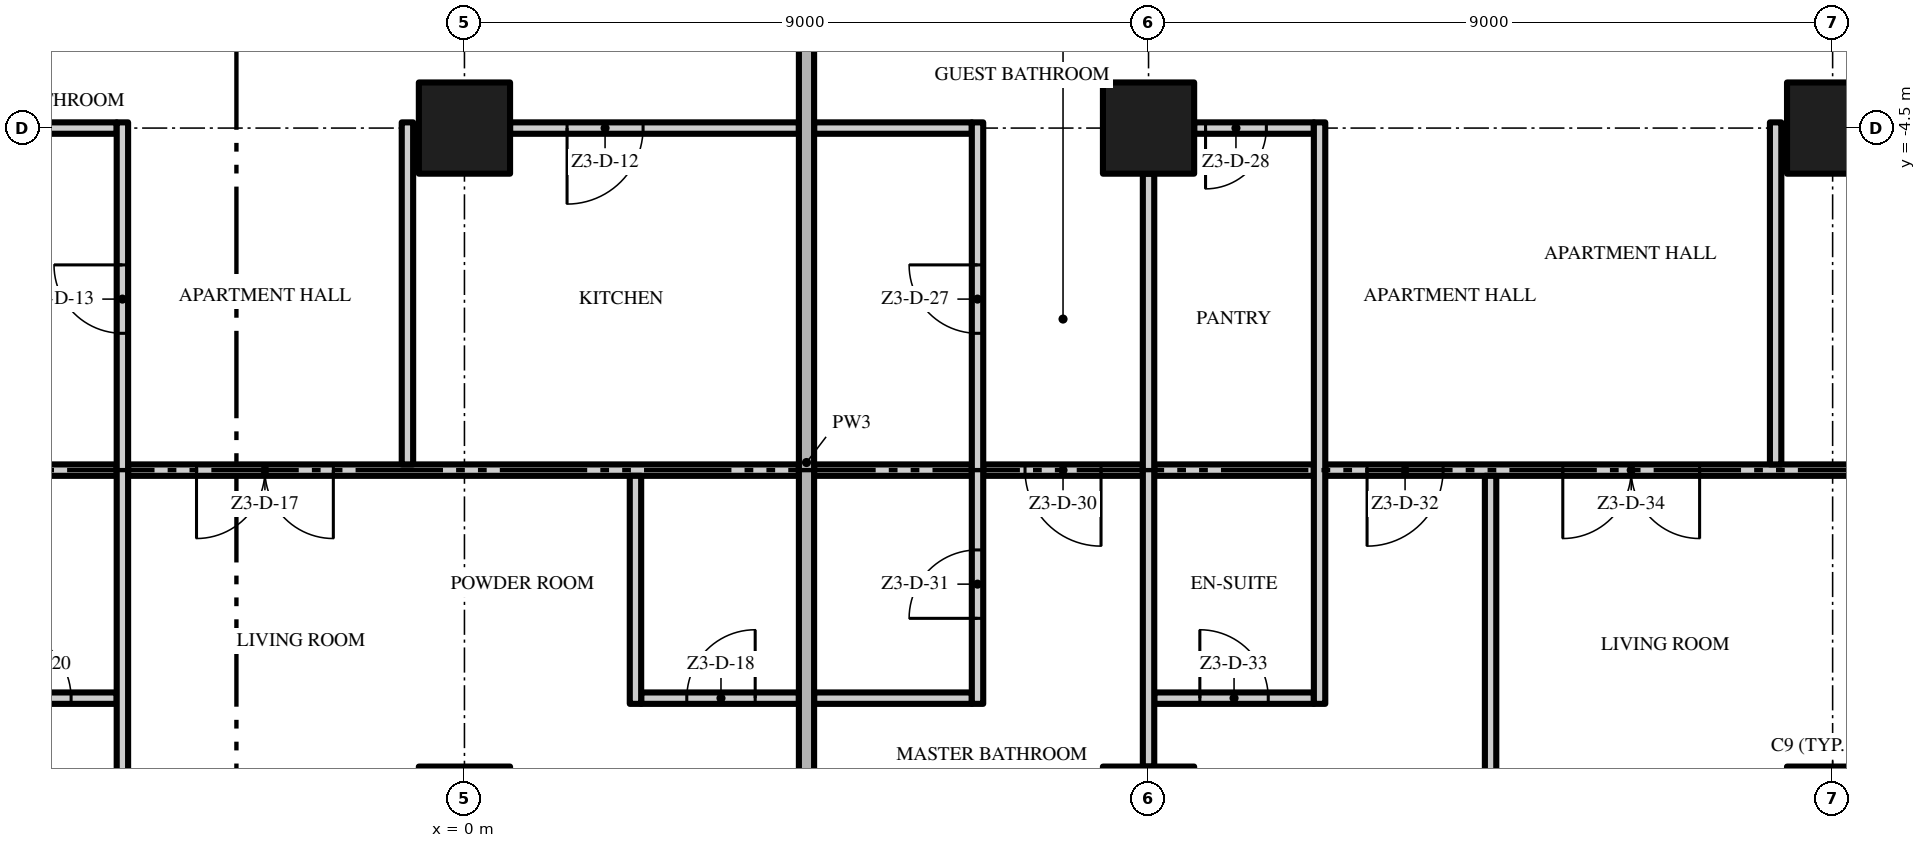
"""IFC4 building model, lengths in metres.
Left out: names, types, materials, properties, quantities, classifications, styles, units other than length and angle.
Written with IfcOpenShell. Run it as: python <this file> out.ifc"""

import sys

from ifc_helpers import new_model, si_unit, direction, frame, frame_2d, origin, origin_2d, place, context, subcontext, project, spatial, rectangle, extrude, element, fill, save


model = new_model("IFC4")
c1 = context("Model", 3, precision=1e-05, world=origin(), true_north=direction((0.0, 1.0)))
c2 = subcontext(c1, "Body", "Model", "MODEL_VIEW")
j1 = project(units=[si_unit("LENGTHUNIT", "METRE"), si_unit("PLANEANGLEUNIT", "RADIAN")], contexts=[c1])
p1 = place(None, origin())
s1 = spatial("IfcSite", under=j1, at=p1, CompositionType="ELEMENT")
p2 = place(p1, origin())
s2 = spatial("IfcBuilding", under=s1, at=p2, CompositionType="ELEMENT")
p3 = place(p2, frame((0.0, 0.0, 163.0)))
s3 = spatial("IfcBuildingStorey", under=s2, at=p3, CompositionType="ELEMENT", Elevation=163.0)
for number, where, z_axis, x_axis in (
    (1, (0.0, -13.5, 0.0), (0.0, 0.0, 1.0), (1.0, 0.0, 0.0)),
    (2, (0.0, -4.5, 0.0), (0.0, 0.0, 1.0), (1.0, 0.0, 0.0)),
    (3, (18.0, -13.5, 0.0), (0.0, 0.0, 1.0), (1.0, 0.0, 0.0)),
    (4, (18.0, -4.5, 0.0), (0.0, 0.0, 1.0), (1.0, 0.0, 0.0)),
    (5, (9.0, -13.5, 0.0), (0.0, 0.0, 1.0), (1.0, 0.0, 0.0)),
    (6, (9.0, -4.5, 0.0), (0.0, 0.0, 1.0), (1.0, 0.0, 0.0)),
):
    element("IfcColumn", number, at=place(p3, frame(where, z_axis=z_axis, x_axis=x_axis)), inside=s3, PredefinedType="COLUMN", context=c2, shape_type="SweptSolid", body=[
        extrude(rectangle(XDim=1.2, YDim=1.2, at=origin_2d()), origin(), (0.0, 0.0, 1.0), 3.5),
    ])
p4 = place(p3, frame((-6.675, -12.0, 0.0), z_axis=(0.0, 0.0, 1.0), x_axis=(1.0, 0.0, 0.0)))
e7 = element("IfcWall", 7, at=p4, inside=s3, PredefinedType="PARTITIONING", context=c2, shape_type="SweptSolid", body=[
    extrude(rectangle(XDim=2.1, YDim=0.15, at=frame_2d((1.05, 0.0))), origin(), (0.0, 0.0, 1.0), 3.5),
])
p5 = place(p4, frame((0.6, 0.0, 0.0)))
e8 = element("IfcOpeningElement", 8, at=p5, cuts=e7, PredefinedType="OPENING", context=c2, shape_type="SweptSolid", body=[
    extrude(rectangle(XDim=0.9, YDim=2.1, at=frame_2d((0.45, 1.05))), frame((0.0, 0.085, 0.0), z_axis=(0.0, -1.0, 0.0), x_axis=(1.0, 0.0, 0.0)), (0.0, 0.0, 1.0), 0.17),
])
p6 = place(p3, frame((2.325, -12.0, 0.0), z_axis=(0.0, 0.0, 1.0), x_axis=(1.0, 0.0, 0.0)))
e9 = element("IfcWall", 9, at=p6, inside=s3, PredefinedType="PARTITIONING", context=c2, shape_type="SweptSolid", body=[
    extrude(rectangle(XDim=2.075, YDim=0.15, at=frame_2d((1.038, 0.0))), origin(), (0.0, 0.0, 1.0), 3.5),
])
p7 = place(p6, frame((0.6, 0.0, 0.0)))
e10 = element("IfcOpeningElement", 10, at=p7, cuts=e9, PredefinedType="OPENING", context=c2, shape_type="SweptSolid", body=[
    extrude(rectangle(XDim=0.9, YDim=2.1, at=frame_2d((0.45, 1.05))), frame((0.0, 0.085, 0.0), z_axis=(0.0, -1.0, 0.0), x_axis=(1.0, 0.0, 0.0)), (0.0, 0.0, 1.0), 0.17),
])
p8 = place(p3, frame((4.6, -12.0, 0.0), z_axis=(0.0, 0.0, 1.0), x_axis=(1.0, 0.0, 0.0)))
e11 = element("IfcWall", 11, at=p8, inside=s3, PredefinedType="PARTITIONING", context=c2, shape_type="SweptSolid", body=[
    extrude(rectangle(XDim=2.075, YDim=0.15, at=frame_2d((1.038, 0.0))), origin(), (0.0, 0.0, 1.0), 3.5),
])
p9 = place(p3, frame((9.075, -12.0, 0.0), z_axis=(0.0, 0.0, 1.0), x_axis=(1.0, 0.0, 0.0)))
e12 = element("IfcWall", 12, at=p9, inside=s3, PredefinedType="PARTITIONING", context=c2, shape_type="SweptSolid", body=[
    extrude(rectangle(XDim=2.1, YDim=0.15, at=frame_2d((1.05, 0.0))), origin(), (0.0, 0.0, 1.0), 3.5),
])
p10 = place(p9, frame((0.6, 0.0, 0.0)))
e13 = element("IfcOpeningElement", 13, at=p10, cuts=e12, PredefinedType="OPENING", context=c2, shape_type="SweptSolid", body=[
    extrude(rectangle(XDim=0.9, YDim=2.1, at=frame_2d((0.45, 1.05))), frame((0.0, 0.085, 0.0), z_axis=(0.0, -1.0, 0.0), x_axis=(1.0, 0.0, 0.0)), (0.0, 0.0, 1.0), 0.17),
])
p11 = place(p3, frame((-6.675, -9.0, 0.0), z_axis=(0.0, 0.0, 1.0), x_axis=(1.0, 0.0, 0.0)))
e14 = element("IfcWall", 14, at=p11, inside=s3, PredefinedType="PARTITIONING", context=c2, shape_type="SweptSolid", body=[
    extrude(rectangle(XDim=2.1, YDim=0.15, at=frame_2d((1.05, 0.0))), origin(), (0.0, 0.0, 1.0), 3.5),
])
p12 = place(p3, frame((4.4, -9.0, 0.0), z_axis=(0.0, 0.0, 1.0), x_axis=(-1.0, 0.0, 0.0)))
e15 = element("IfcWall", 15, at=p12, inside=s3, PredefinedType="PARTITIONING", context=c2, shape_type="SweptSolid", body=[
    extrude(rectangle(XDim=8.825, YDim=0.15, at=frame_2d((4.412, 0.0))), origin(), (0.0, 0.0, 1.0), 3.5),
])
p13 = place(p12, frame((6.125, 0.0, 0.0)))
e16 = element("IfcOpeningElement", 16, at=p13, cuts=e15, PredefinedType="OPENING", context=c2, shape_type="SweptSolid", body=[
    extrude(rectangle(XDim=1.8, YDim=2.4, at=frame_2d((0.9, 1.2))), frame((0.0, 0.085, 0.0), z_axis=(0.0, -1.0, 0.0), x_axis=(1.0, 0.0, 0.0)), (0.0, 0.0, 1.0), 0.17),
])
p14 = place(p3, frame((4.6, -9.0, 0.0), z_axis=(0.0, 0.0, 1.0), x_axis=(1.0, 0.0, 0.0)))
e17 = element("IfcWall", 17, at=p14, inside=s3, PredefinedType="PARTITIONING", context=c2, shape_type="SweptSolid", body=[
    extrude(rectangle(XDim=2.075, YDim=0.15, at=frame_2d((1.038, 0.0))), origin(), (0.0, 0.0, 1.0), 3.5),
])
p15 = place(p3, frame((8.925, -9.0, 0.0), z_axis=(0.0, 0.0, 1.0), x_axis=(-1.0, 0.0, 0.0)))
e18 = element("IfcWall", 18, at=p15, inside=s3, PredefinedType="PARTITIONING", context=c2, shape_type="SweptSolid", body=[
    extrude(rectangle(XDim=2.1, YDim=0.15, at=frame_2d((1.05, 0.0))), origin(), (0.0, 0.0, 1.0), 3.5),
])
p16 = place(p15, frame((0.55, 0.0, 0.0)))
e19 = element("IfcOpeningElement", 19, at=p16, cuts=e18, PredefinedType="OPENING", context=c2, shape_type="SweptSolid", body=[
    extrude(rectangle(XDim=1.0, YDim=2.4, at=frame_2d((0.5, 1.2))), frame((0.0, 0.085, 0.0), z_axis=(0.0, -1.0, 0.0), x_axis=(1.0, 0.0, 0.0)), (0.0, 0.0, 1.0), 0.17),
])
p17 = place(p3, frame((9.075, -9.0, 0.0), z_axis=(0.0, 0.0, 1.0), x_axis=(1.0, 0.0, 0.0)))
e20 = element("IfcWall", 20, at=p17, inside=s3, PredefinedType="PARTITIONING", context=c2, shape_type="SweptSolid", body=[
    extrude(rectangle(XDim=2.1, YDim=0.15, at=frame_2d((1.05, 0.0))), origin(), (0.0, 0.0, 1.0), 3.5),
])
p18 = place(p3, frame((22.2, -9.0, 0.0), z_axis=(0.0, 0.0, 1.0), x_axis=(-1.0, 0.0, 0.0)))
e21 = element("IfcWall", 21, at=p18, inside=s3, PredefinedType="PARTITIONING", context=c2, shape_type="SweptSolid", body=[
    extrude(rectangle(XDim=10.875, YDim=0.15, at=frame_2d((5.438, 0.0))), origin(), (0.0, 0.0, 1.0), 3.5),
])
p19 = place(p18, frame((9.325, 0.0, 0.0)))
e22 = element("IfcOpeningElement", 22, at=p19, cuts=e21, PredefinedType="OPENING", context=c2, shape_type="SweptSolid", body=[
    extrude(rectangle(XDim=1.0, YDim=2.4, at=frame_2d((0.5, 1.2))), frame((0.0, 0.085, 0.0), z_axis=(0.0, -1.0, 0.0), x_axis=(1.0, 0.0, 0.0)), (0.0, 0.0, 1.0), 0.17),
])
p20 = place(p18, frame((5.95, 0.0, 0.0)))
e23 = element("IfcOpeningElement", 23, at=p20, cuts=e21, PredefinedType="OPENING", context=c2, shape_type="SweptSolid", body=[
    extrude(rectangle(XDim=1.8, YDim=2.4, at=frame_2d((0.9, 1.2))), frame((0.0, 0.085, 0.0), z_axis=(0.0, -1.0, 0.0), x_axis=(1.0, 0.0, 0.0)), (0.0, 0.0, 1.0), 0.17),
])
p21 = place(p3, frame((-6.675, -4.5, 0.0), z_axis=(0.0, 0.0, 1.0), x_axis=(1.0, 0.0, 0.0)))
e24 = element("IfcWall", 24, at=p21, inside=s3, PredefinedType="PARTITIONING", context=c2, shape_type="SweptSolid", body=[
    extrude(rectangle(XDim=2.1, YDim=0.15, at=frame_2d((1.05, 0.0))), origin(), (0.0, 0.0, 1.0), 3.5),
])
p22 = place(p3, frame((4.4, -4.5, 0.0), z_axis=(0.0, 0.0, 1.0), x_axis=(-1.0, 0.0, 0.0)))
e25 = element("IfcWall", 25, at=p22, inside=s3, PredefinedType="PARTITIONING", context=c2, shape_type="SweptSolid", body=[
    extrude(rectangle(XDim=3.8, YDim=0.15, at=frame_2d((1.9, 0.0))), origin(), (0.0, 0.0, 1.0), 3.5),
])
p23 = place(p22, frame((2.05, 0.0, 0.0)))
e26 = element("IfcOpeningElement", 26, at=p23, cuts=e25, PredefinedType="OPENING", context=c2, shape_type="SweptSolid", body=[
    extrude(rectangle(XDim=1.0, YDim=2.4, at=frame_2d((0.5, 1.2))), frame((0.0, 0.085, 0.0), z_axis=(0.0, -1.0, 0.0), x_axis=(1.0, 0.0, 0.0)), (0.0, 0.0, 1.0), 0.17),
])
p24 = place(p3, frame((4.6, -4.5, 0.0), z_axis=(0.0, 0.0, 1.0), x_axis=(1.0, 0.0, 0.0)))
e27 = element("IfcWall", 27, at=p24, inside=s3, PredefinedType="PARTITIONING", context=c2, shape_type="SweptSolid", body=[
    extrude(rectangle(XDim=2.075, YDim=0.15, at=frame_2d((1.038, 0.0))), origin(), (0.0, 0.0, 1.0), 3.5),
])
p25 = place(p3, frame((11.175, -4.5, 0.0), z_axis=(0.0, 0.0, 1.0), x_axis=(-1.0, 0.0, 0.0)))
e28 = element("IfcWall", 28, at=p25, inside=s3, PredefinedType="PARTITIONING", context=c2, shape_type="SweptSolid", body=[
    extrude(rectangle(XDim=1.575, YDim=0.15, at=frame_2d((0.787, 0.0))), origin(), (0.0, 0.0, 1.0), 3.5),
])
p26 = place(p25, frame((0.625, 0.0, 0.0)))
e29 = element("IfcOpeningElement", 29, at=p26, cuts=e28, PredefinedType="OPENING", context=c2, shape_type="SweptSolid", body=[
    extrude(rectangle(XDim=0.8, YDim=2.0, at=frame_2d((0.4, 1.0))), frame((0.0, 0.085, 0.0), z_axis=(0.0, -1.0, 0.0), x_axis=(1.0, 0.0, 0.0)), (0.0, 0.0, 1.0), 0.17),
])
p27 = place(p3, frame((-4.5, -17.7, 0.0), z_axis=(0.0, 0.0, 1.0), x_axis=(0.0, 1.0, 0.0)))
e30 = element("IfcWall", 30, at=p27, inside=s3, PredefinedType="PARTITIONING", context=c2, shape_type="SweptSolid", body=[
    extrude(rectangle(XDim=13.275, YDim=0.15, at=frame_2d((6.638, 0.0))), origin(), (0.0, 0.0, 1.0), 3.5),
])
p28 = place(p27, frame((10.5, 0.0, 0.0)))
e31 = element("IfcOpeningElement", 31, at=p28, cuts=e30, PredefinedType="OPENING", context=c2, shape_type="SweptSolid", body=[
    extrude(rectangle(XDim=0.9, YDim=2.1, at=frame_2d((0.45, 1.05))), frame((0.0, 0.085, 0.0), z_axis=(0.0, -1.0, 0.0), x_axis=(1.0, 0.0, 0.0)), (0.0, 0.0, 1.0), 0.17),
])
p29 = place(p3, frame((-0.75, -8.925, 0.0), z_axis=(0.0, 0.0, 1.0), x_axis=(0.0, 1.0, 0.0)))
e32 = element("IfcWall", 32, at=p29, inside=s3, PredefinedType="PARTITIONING", context=c2, shape_type="SweptSolid", body=[
    extrude(rectangle(XDim=4.5, YDim=0.15, at=frame_2d((2.25, 0.0))), origin(), (0.0, 0.0, 1.0), 3.5),
])
p30 = place(p3, frame((2.25, -12.075, 0.0), z_axis=(0.0, 0.0, 1.0), x_axis=(0.0, 1.0, 0.0)))
e33 = element("IfcWall", 33, at=p30, inside=s3, PredefinedType="PARTITIONING", context=c2, shape_type="SweptSolid", body=[
    extrude(rectangle(XDim=3.0, YDim=0.15, at=frame_2d((1.5, 0.0))), origin(), (0.0, 0.0, 1.0), 3.5),
])
p31 = place(p3, frame((4.5, -17.7, 0.0), z_axis=(0.0, 0.0, 1.0), x_axis=(0.0, 1.0, 0.0)))
e34 = element("IfcWall", 34, at=p31, inside=s3, PredefinedType="PARTITIONING", context=c2, shape_type="SweptSolid", body=[
    extrude(rectangle(XDim=17.6, YDim=0.2, at=frame_2d((8.8, 0.0))), origin(), (0.0, 0.0, 1.0), 3.5),
])
p32 = place(p3, frame((6.75, -12.075, 0.0), z_axis=(0.0, 0.0, 1.0), x_axis=(0.0, 1.0, 0.0)))
e35 = element("IfcWall", 35, at=p32, inside=s3, PredefinedType="PARTITIONING", context=c2, shape_type="SweptSolid", body=[
    extrude(rectangle(XDim=7.65, YDim=0.15, at=frame_2d((3.825, 0.0))), origin(), (0.0, 0.0, 1.0), 3.5),
])
p33 = place(p32, frame((4.875, 0.0, 0.0)))
e36 = element("IfcOpeningElement", 36, at=p33, cuts=e35, PredefinedType="OPENING", context=c2, shape_type="SweptSolid", body=[
    extrude(rectangle(XDim=0.9, YDim=2.1, at=frame_2d((0.45, 1.05))), frame((0.0, 0.085, 0.0), z_axis=(0.0, -1.0, 0.0), x_axis=(1.0, 0.0, 0.0)), (0.0, 0.0, 1.0), 0.17),
])
p34 = place(p32, frame((1.125, 0.0, 0.0)))
e37 = element("IfcOpeningElement", 37, at=p34, cuts=e35, PredefinedType="OPENING", context=c2, shape_type="SweptSolid", body=[
    extrude(rectangle(XDim=0.9, YDim=2.1, at=frame_2d((0.45, 1.05))), frame((0.0, 0.085, 0.0), z_axis=(0.0, -1.0, 0.0), x_axis=(1.0, 0.0, 0.0)), (0.0, 0.0, 1.0), 0.17),
])
p35 = place(p3, frame((9.0, -12.9, 0.0), z_axis=(0.0, 0.0, 1.0), x_axis=(0.0, 1.0, 0.0)))
e38 = element("IfcWall", 38, at=p35, inside=s3, PredefinedType="PARTITIONING", context=c2, shape_type="SweptSolid", body=[
    extrude(rectangle(XDim=7.8, YDim=0.15, at=frame_2d((3.9, 0.0))), origin(), (0.0, 0.0, 1.0), 3.5),
])
p36 = place(p3, frame((11.25, -12.075, 0.0), z_axis=(0.0, 0.0, 1.0), x_axis=(0.0, 1.0, 0.0)))
e39 = element("IfcWall", 39, at=p36, inside=s3, PredefinedType="PARTITIONING", context=c2, shape_type="SweptSolid", body=[
    extrude(rectangle(XDim=7.65, YDim=0.15, at=frame_2d((3.825, 0.0))), origin(), (0.0, 0.0, 1.0), 3.5),
])
p37 = place(p3, frame((13.5, -17.7, 0.0), z_axis=(0.0, 0.0, 1.0), x_axis=(0.0, 1.0, 0.0)))
e40 = element("IfcWall", 40, at=p37, inside=s3, PredefinedType="PARTITIONING", context=c2, shape_type="SweptSolid", body=[
    extrude(rectangle(XDim=8.625, YDim=0.15, at=frame_2d((4.312, 0.0))), origin(), (0.0, 0.0, 1.0), 3.5),
])
p38 = place(p3, frame((17.25, -8.925, 0.0), z_axis=(0.0, 0.0, 1.0), x_axis=(0.0, 1.0, 0.0)))
e41 = element("IfcWall", 41, at=p38, inside=s3, PredefinedType="PARTITIONING", context=c2, shape_type="SweptSolid", body=[
    extrude(rectangle(XDim=4.5, YDim=0.15, at=frame_2d((2.25, 0.0))), origin(), (0.0, 0.0, 1.0), 3.5),
])
p39 = place(p23, origin())
e42 = element("IfcDoor", 42, at=p39, inside=s3, OperationType="SINGLE_SWING_RIGHT", PredefinedType="DOOR", context=c2, shape_type="SweptSolid", body=[
    extrude(rectangle(XDim=1.0, YDim=2.4, at=frame_2d((0.5, 1.2))), frame((0.0, 0.025, 0.0), z_axis=(0.0, -1.0, 0.0), x_axis=(1.0, 0.0, 0.0)), (0.0, 0.0, 1.0), 0.05),
])
fill(e26, e42)
p40 = place(p28, origin())
e43 = element("IfcDoor", 43, at=p40, inside=s3, OperationType="SINGLE_SWING_RIGHT", PredefinedType="DOOR", context=c2, shape_type="SweptSolid", body=[
    extrude(rectangle(XDim=0.9, YDim=2.1, at=frame_2d((0.45, 1.05))), frame((0.0, 0.025, 0.0), z_axis=(0.0, -1.0, 0.0), x_axis=(1.0, 0.0, 0.0)), (0.0, 0.0, 1.0), 0.05),
])
fill(e31, e43)
p41 = place(p13, origin())
e44 = element("IfcDoor", 44, at=p41, inside=s3, OperationType="DOUBLE_DOOR_SINGLE_SWING", PredefinedType="DOOR", context=c2, shape_type="SweptSolid", body=[
    extrude(rectangle(XDim=1.8, YDim=2.4, at=frame_2d((0.9, 1.2))), frame((0.0, 0.025, 0.0), z_axis=(0.0, -1.0, 0.0), x_axis=(1.0, 0.0, 0.0)), (0.0, 0.0, 1.0), 0.05),
])
fill(e16, e44)
p42 = place(p7, origin())
e45 = element("IfcDoor", 45, at=p42, inside=s3, OperationType="SINGLE_SWING_RIGHT", PredefinedType="DOOR", context=c2, shape_type="SweptSolid", body=[
    extrude(rectangle(XDim=0.9, YDim=2.1, at=frame_2d((0.45, 1.05))), frame((0.0, 0.025, 0.0), z_axis=(0.0, -1.0, 0.0), x_axis=(1.0, 0.0, 0.0)), (0.0, 0.0, 1.0), 0.05),
])
fill(e10, e45)
p43 = place(p5, origin())
e46 = element("IfcDoor", 46, at=p43, inside=s3, OperationType="SINGLE_SWING_LEFT", PredefinedType="DOOR", context=c2, shape_type="SweptSolid", body=[
    extrude(rectangle(XDim=0.9, YDim=2.1, at=frame_2d((0.45, 1.05))), frame((0.0, 0.025, 0.0), z_axis=(0.0, -1.0, 0.0), x_axis=(1.0, 0.0, 0.0)), (0.0, 0.0, 1.0), 0.05),
])
fill(e8, e46)
p44 = place(p33, origin())
e47 = element("IfcDoor", 47, at=p44, inside=s3, OperationType="SINGLE_SWING_RIGHT", PredefinedType="DOOR", context=c2, shape_type="SweptSolid", body=[
    extrude(rectangle(XDim=0.9, YDim=2.1, at=frame_2d((0.45, 1.05))), frame((0.0, 0.025, 0.0), z_axis=(0.0, -1.0, 0.0), x_axis=(1.0, 0.0, 0.0)), (0.0, 0.0, 1.0), 0.05),
])
fill(e36, e47)
p45 = place(p26, origin())
e48 = element("IfcDoor", 48, at=p45, inside=s3, OperationType="SINGLE_SWING_RIGHT", PredefinedType="DOOR", context=c2, shape_type="SweptSolid", body=[
    extrude(rectangle(XDim=0.8, YDim=2.0, at=frame_2d((0.4, 1.0))), frame((0.0, 0.025, 0.0), z_axis=(0.0, -1.0, 0.0), x_axis=(1.0, 0.0, 0.0)), (0.0, 0.0, 1.0), 0.05),
])
fill(e29, e48)
p46 = place(p16, origin())
e49 = element("IfcDoor", 49, at=p46, inside=s3, OperationType="SINGLE_SWING_LEFT", PredefinedType="DOOR", context=c2, shape_type="SweptSolid", body=[
    extrude(rectangle(XDim=1.0, YDim=2.4, at=frame_2d((0.5, 1.2))), frame((0.0, 0.025, 0.0), z_axis=(0.0, -1.0, 0.0), x_axis=(1.0, 0.0, 0.0)), (0.0, 0.0, 1.0), 0.05),
])
fill(e19, e49)
p47 = place(p34, origin())
e50 = element("IfcDoor", 50, at=p47, inside=s3, OperationType="SINGLE_SWING_LEFT", PredefinedType="DOOR", context=c2, shape_type="SweptSolid", body=[
    extrude(rectangle(XDim=0.9, YDim=2.1, at=frame_2d((0.45, 1.05))), frame((0.0, 0.025, 0.0), z_axis=(0.0, -1.0, 0.0), x_axis=(1.0, 0.0, 0.0)), (0.0, 0.0, 1.0), 0.05),
])
fill(e37, e50)
p48 = place(p19, origin())
e51 = element("IfcDoor", 51, at=p48, inside=s3, OperationType="SINGLE_SWING_RIGHT", PredefinedType="DOOR", context=c2, shape_type="SweptSolid", body=[
    extrude(rectangle(XDim=1.0, YDim=2.4, at=frame_2d((0.5, 1.2))), frame((0.0, 0.025, 0.0), z_axis=(0.0, -1.0, 0.0), x_axis=(1.0, 0.0, 0.0)), (0.0, 0.0, 1.0), 0.05),
])
fill(e22, e51)
p49 = place(p10, origin())
e52 = element("IfcDoor", 52, at=p49, inside=s3, OperationType="SINGLE_SWING_LEFT", PredefinedType="DOOR", context=c2, shape_type="SweptSolid", body=[
    extrude(rectangle(XDim=0.9, YDim=2.1, at=frame_2d((0.45, 1.05))), frame((0.0, 0.025, 0.0), z_axis=(0.0, -1.0, 0.0), x_axis=(1.0, 0.0, 0.0)), (0.0, 0.0, 1.0), 0.05),
])
fill(e13, e52)
p50 = place(p20, origin())
e53 = element("IfcDoor", 53, at=p50, inside=s3, OperationType="DOUBLE_DOOR_SINGLE_SWING", PredefinedType="DOOR", context=c2, shape_type="SweptSolid", body=[
    extrude(rectangle(XDim=1.8, YDim=2.4, at=frame_2d((0.9, 1.2))), frame((0.0, 0.025, 0.0), z_axis=(0.0, -1.0, 0.0), x_axis=(1.0, 0.0, 0.0)), (0.0, 0.0, 1.0), 0.05),
])
fill(e23, e53)
save(model, sys.argv[1])
